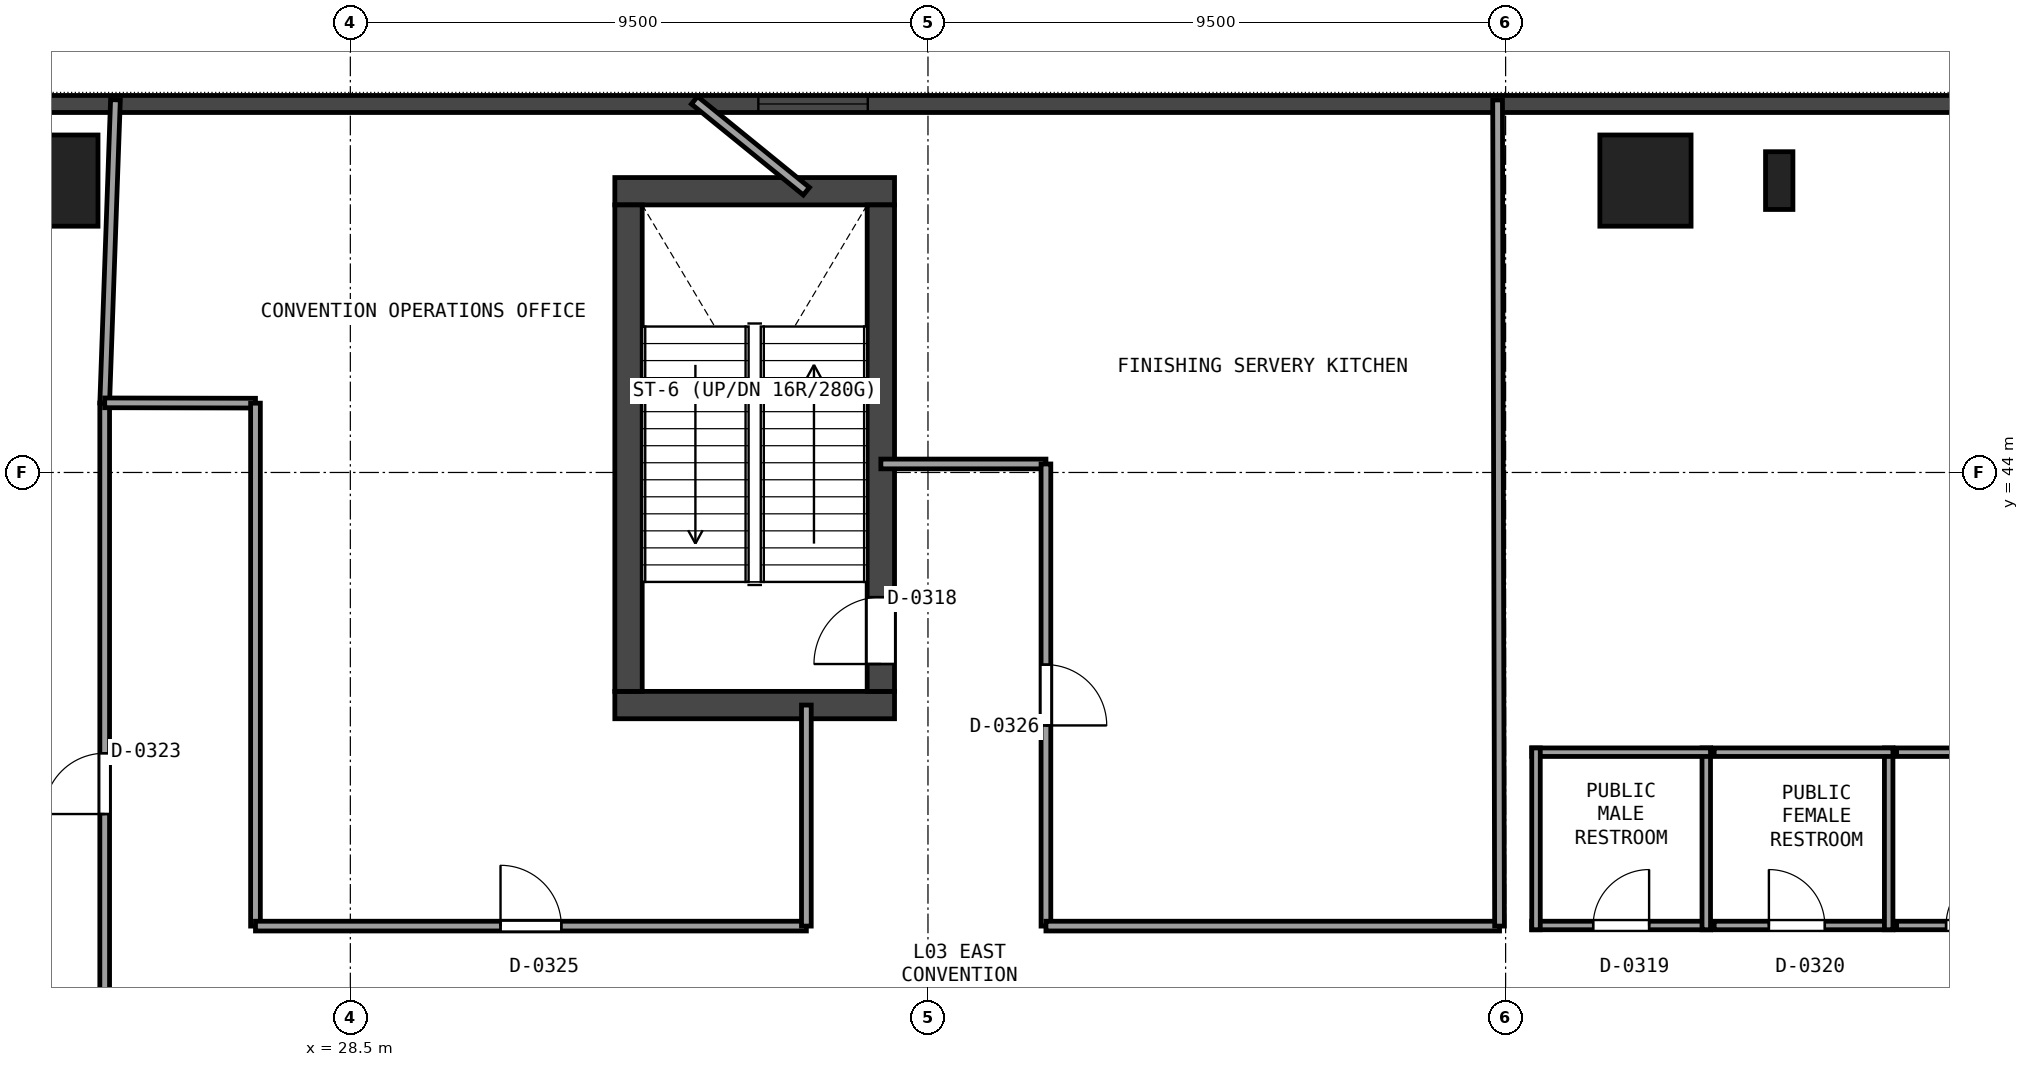
"""IFC4 building model, lengths in metres.
Left out: names, types, materials, properties, quantities, classifications, styles, units other than length and angle.
Written with IfcOpenShell. Run it as: python <this file> out.ifc"""

import sys

from ifc_helpers import new_model, si_unit, direction, frame, frame_2d, origin, origin_2d, place, context, subcontext, project, spatial, rectangle, extrude, element, fill, save


model = new_model("IFC4")
c1 = context("Model", 3, precision=1e-05, world=origin(), true_north=direction((0.0, 1.0)))
c2 = subcontext(c1, "Body", "Model", "MODEL_VIEW")
j1 = project(units=[si_unit("LENGTHUNIT", "METRE"), si_unit("PLANEANGLEUNIT", "RADIAN")], contexts=[c1])
p1 = place(None, origin())
s1 = spatial("IfcSite", under=j1, at=p1, CompositionType="ELEMENT")
p2 = place(p1, origin())
s2 = spatial("IfcBuilding", under=s1, at=p2, CompositionType="ELEMENT")
p3 = place(p2, frame((0.0, 0.0, 16.2)))
s3 = spatial("IfcBuildingStorey", under=s2, at=p3, CompositionType="ELEMENT", Elevation=16.2)
for number, where, z_axis, x_axis in (
    (1, (32.85, 40.175, 0.0), (0.0, 0.0, 1.0), (1.0, 0.0, 0.0)),
    (2, (32.85, 48.625, 0.0), (0.0, 0.0, 1.0), (1.0, 0.0, 0.0)),
):
    element("IfcWall", number, at=place(p3, frame(where, z_axis=z_axis, x_axis=x_axis)), inside=s3, PredefinedType="SHEAR", context=c2, shape_type="SweptSolid", body=[
        extrude(rectangle(XDim=4.6, YDim=0.45, at=frame_2d((2.3, 0.0))), origin(), (0.0, 0.0, 1.0), 4.98),
    ])
p4 = place(p3, frame((33.075, 40.4, 0.0), z_axis=(0.0, 0.0, 1.0), x_axis=(0.0, 1.0, 0.0)))
e3 = element("IfcWall", 3, at=p4, inside=s3, PredefinedType="SHEAR", context=c2, shape_type="SweptSolid", body=[
    extrude(rectangle(XDim=8.0, YDim=0.45, at=frame_2d((4.0, 0.0))), origin(), (0.0, 0.0, 1.0), 4.98),
])
p5 = place(p3, frame((37.225, 40.4, 0.0), z_axis=(0.0, 0.0, 1.0), x_axis=(0.0, 1.0, 0.0)))
e4 = element("IfcWall", 4, at=p5, inside=s3, PredefinedType="SHEAR", context=c2, shape_type="SweptSolid", body=[
    extrude(rectangle(XDim=8.0, YDim=0.45, at=frame_2d((4.0, 0.0))), origin(), (0.0, 0.0, 1.0), 4.98),
])
p6 = place(p5, frame((0.45, 0.0, 0.0)))
e5 = element("IfcOpeningElement", 5, at=p6, cuts=e4, PredefinedType="OPENING", context=c2, shape_type="SweptSolid", body=[
    extrude(rectangle(XDim=1.1, YDim=2.15, at=frame_2d((0.55, 1.075))), frame((0.0, 0.235, 0.0), z_axis=(0.0, -1.0, 0.0), x_axis=(1.0, 0.0, 0.0)), (0.0, 0.0, 1.0), 0.47),
])
for number, where, z_axis, x_axis in (
    (6, (49.8, 48.8, 0.0), (0.0, 0.0, 1.0), (1.0, 0.0, 0.0)),
    (7, (23.6, 48.8, 0.0), (0.0, 0.0, 1.0), (1.0, 0.0, 0.0)),
):
    element("IfcColumn", number, at=place(p3, frame(where, z_axis=z_axis, x_axis=x_axis)), inside=s3, PredefinedType="COLUMN", context=c2, shape_type="SweptSolid", body=[
        extrude(rectangle(XDim=1.5, YDim=1.5, at=origin_2d()), origin(), (0.0, 0.0, 1.0), 4.98),
    ])
p7 = place(p3, frame((52.0, 48.8, 0.0), z_axis=(0.0, 0.0, 1.0), x_axis=(1.0, 0.0, 0.0)))
e8 = element("IfcColumn", 8, at=p7, inside=s3, PredefinedType="PILASTER", context=c2, shape_type="SweptSolid", body=[
    extrude(rectangle(XDim=0.45, YDim=0.95, at=origin_2d()), origin(), (0.0, 0.0, 1.0), 4.98),
])
p8 = place(p3, frame((5.14, 50.06, 0.0), z_axis=(0.0, 0.0, 1.0), x_axis=(1.0, 0.0, 0.0)))
e9 = element("IfcWall", 9, at=p8, inside=s3, PredefinedType="SOLIDWALL", context=c2, shape_type="SweptSolid", body=[
    extrude(rectangle(XDim=64.52, YDim=0.28, at=frame_2d((32.26, 0.0))), origin(), (0.0, 0.0, 1.0), 4.98),
])
p9 = place(p8, frame((30.07, 0.0, 0.95)))
e10 = element("IfcOpeningElement", 10, at=p9, cuts=e9, PredefinedType="OPENING", context=c2, shape_type="SweptSolid", body=[
    extrude(rectangle(XDim=1.8, YDim=2.3, at=frame_2d((0.9, 1.15))), frame((0.0, 0.15, 0.0), z_axis=(0.0, -1.0, 0.0), x_axis=(1.0, 0.0, 0.0)), (0.0, 0.0, 1.0), 0.3),
])
p10 = place(p3, frame((47.93, 36.55, 0.0), z_axis=(0.0, 0.0, 1.0), x_axis=(1.0, 0.0, 0.0)))
e11 = element("IfcWall", 11, at=p10, inside=s3, PredefinedType="PARTITIONING", context=c2, shape_type="SweptSolid", body=[
    extrude(rectangle(XDim=2.94, YDim=0.14, at=frame_2d((1.47, 0.0))), origin(), (0.0, 0.0, 1.0), 4.065),
])
p11 = place(p10, frame((1.01, 0.0, 0.0)))
e12 = element("IfcOpeningElement", 12, at=p11, cuts=e11, PredefinedType="OPENING", context=c2, shape_type="SweptSolid", body=[
    extrude(rectangle(XDim=0.92, YDim=2.1, at=frame_2d((0.46, 1.05))), frame((0.0, 0.08, 0.0), z_axis=(0.0, -1.0, 0.0), x_axis=(1.0, 0.0, 0.0)), (0.0, 0.0, 1.0), 0.16),
])
p12 = place(p3, frame((50.8, 36.48, 0.0), z_axis=(0.0, 0.0, 1.0), x_axis=(0.0, 1.0, 0.0)))
e13 = element("IfcWall", 13, at=p12, inside=s3, PredefinedType="PARTITIONING", context=c2, shape_type="SweptSolid", body=[
    extrude(rectangle(XDim=2.99, YDim=0.14, at=frame_2d((1.495, 0.0))), origin(), (0.0, 0.0, 1.0), 4.609),
])
p13 = place(p3, frame((50.87, 39.4, 0.0), z_axis=(0.0, 0.0, 1.0), x_axis=(-1.0, 0.0, 0.0)))
e14 = element("IfcWall", 14, at=p13, inside=s3, PredefinedType="PARTITIONING", context=c2, shape_type="SweptSolid", body=[
    extrude(rectangle(XDim=2.94, YDim=0.14, at=frame_2d((1.47, 0.0))), origin(), (0.0, 0.0, 1.0), 4.065),
])
p14 = place(p3, frame((48.0, 39.47, 0.0), z_axis=(0.0, 0.0, 1.0), x_axis=(0.0, -1.0, 0.0)))
e15 = element("IfcWall", 15, at=p14, inside=s3, PredefinedType="PARTITIONING", context=c2, shape_type="SweptSolid", body=[
    extrude(rectangle(XDim=2.99, YDim=0.14, at=frame_2d((1.495, 0.0))), origin(), (0.0, 0.0, 1.0), 4.065),
])
p15 = place(p3, frame((50.93, 36.55, 0.0), z_axis=(0.0, 0.0, 1.0), x_axis=(1.0, 0.0, 0.0)))
e16 = element("IfcWall", 16, at=p15, inside=s3, PredefinedType="PARTITIONING", context=c2, shape_type="SweptSolid", body=[
    extrude(rectangle(XDim=2.94, YDim=0.14, at=frame_2d((1.47, 0.0))), origin(), (0.0, 0.0, 1.0), 4.98),
])
p16 = place(p15, frame((0.9, 0.0, 0.0)))
e17 = element("IfcOpeningElement", 17, at=p16, cuts=e16, PredefinedType="OPENING", context=c2, shape_type="SweptSolid", body=[
    extrude(rectangle(XDim=0.92, YDim=2.1, at=frame_2d((0.46, 1.05))), frame((0.0, 0.08, 0.0), z_axis=(0.0, -1.0, 0.0), x_axis=(1.0, 0.0, 0.0)), (0.0, 0.0, 1.0), 0.16),
])
p17 = place(p3, frame((53.8, 36.48, 0.0), z_axis=(0.0, 0.0, 1.0), x_axis=(0.0, 1.0, 0.0)))
e18 = element("IfcWall", 18, at=p17, inside=s3, PredefinedType="PARTITIONING", context=c2, shape_type="SweptSolid", body=[
    extrude(rectangle(XDim=2.99, YDim=0.14, at=frame_2d((1.495, 0.0))), origin(), (0.0, 0.0, 1.0), 4.609),
])
p18 = place(p3, frame((53.87, 39.4, 0.0), z_axis=(0.0, 0.0, 1.0), x_axis=(-1.0, 0.0, 0.0)))
e19 = element("IfcWall", 19, at=p18, inside=s3, PredefinedType="PARTITIONING", context=c2, shape_type="SweptSolid", body=[
    extrude(rectangle(XDim=2.94, YDim=0.14, at=frame_2d((1.47, 0.0))), origin(), (0.0, 0.0, 1.0), 4.609),
])
p19 = place(p3, frame((53.93, 36.55, 0.0), z_axis=(0.0, 0.0, 1.0), x_axis=(1.0, 0.0, 0.0)))
e20 = element("IfcWall", 20, at=p19, inside=s3, PredefinedType="PARTITIONING", context=c2, shape_type="SweptSolid", body=[
    extrude(rectangle(XDim=2.74, YDim=0.14, at=frame_2d((1.37, 0.0))), origin(), (0.0, 0.0, 1.0), 4.98),
])
p20 = place(p19, frame((0.814, 0.0, 0.0)))
e21 = element("IfcOpeningElement", 21, at=p20, cuts=e20, PredefinedType="OPENING", context=c2, shape_type="SweptSolid", body=[
    extrude(rectangle(XDim=0.92, YDim=2.1, at=frame_2d((0.46, 1.05))), frame((0.0, 0.08, 0.0), z_axis=(0.0, -1.0, 0.0), x_axis=(1.0, 0.0, 0.0)), (0.0, 0.0, 1.0), 0.16),
])
p21 = place(p3, frame((56.67, 39.4, 0.0), z_axis=(0.0, 0.0, 1.0), x_axis=(-1.0, 0.0, 0.0)))
e22 = element("IfcWall", 22, at=p21, inside=s3, PredefinedType="PARTITIONING", context=c2, shape_type="SweptSolid", body=[
    extrude(rectangle(XDim=2.74, YDim=0.14, at=frame_2d((1.37, 0.0))), origin(), (0.0, 0.0, 1.0), 4.609),
])
p22 = place(p3, frame((24.46, 32.625, 0.0), z_axis=(0.0, 0.0, 1.0), x_axis=(0.0, 1.0, 0.0)))
e23 = element("IfcWall", 23, at=p22, inside=s3, PredefinedType="PARTITIONING", context=c2, shape_type="SweptSolid", body=[
    extrude(rectangle(XDim=12.515, YDim=0.16, at=frame_2d((6.257, 0.0))), origin(), (0.0, 0.0, 1.0), 4.065),
])
p23 = place(p22, frame((5.758, 0.0, 0.0)))
e24 = element("IfcOpeningElement", 24, at=p23, cuts=e23, PredefinedType="OPENING", context=c2, shape_type="SweptSolid", body=[
    extrude(rectangle(XDim=1.0, YDim=2.15, at=frame_2d((0.5, 1.075))), frame((0.0, 0.09, 0.0), z_axis=(0.0, -1.0, 0.0), x_axis=(1.0, 0.0, 0.0)), (0.0, 0.0, 1.0), 0.18),
])
p24 = place(p3, frame((24.46, 45.14, 0.0), z_axis=(0.0, 0.0, 1.0), x_axis=(0.035456038504, 0.999371236995, 0.0)))
e25 = element("IfcWall", 25, at=p24, inside=s3, PredefinedType="PARTITIONING", context=c2, shape_type="SweptSolid", body=[
    extrude(rectangle(XDim=4.992, YDim=0.16, at=frame_2d((2.496, 0.0))), origin(), (0.0, 0.0, 1.0), 4.065),
])
p25 = place(p3, frame((24.46, 45.145, 0.0), z_axis=(0.0, 0.0, 1.0), x_axis=(0.999997863068, -0.002067331672, 0.0)))
e26 = element("IfcWall", 26, at=p25, inside=s3, PredefinedType="PARTITIONING", context=c2, shape_type="SweptSolid", body=[
    extrude(rectangle(XDim=2.48, YDim=0.16, at=frame_2d((1.24, 0.0))), origin(), (0.0, 0.0, 1.0), 4.065),
])
p26 = place(p3, frame((26.94, 45.14, 0.0), z_axis=(0.0, 0.0, 1.0), x_axis=(0.0, -1.0, 0.0)))
e27 = element("IfcWall", 27, at=p26, inside=s3, PredefinedType="PARTITIONING", context=c2, shape_type="SweptSolid", body=[
    extrude(rectangle(XDim=8.6, YDim=0.16, at=frame_2d((4.3, 0.0))), origin(), (0.0, 0.0, 1.0), 4.98),
])
p27 = place(p3, frame((26.94, 36.54, 0.0), z_axis=(0.0, 0.0, 1.0), x_axis=(1.0, 0.0, 0.0)))
e28 = element("IfcWall", 28, at=p27, inside=s3, PredefinedType="PARTITIONING", context=c2, shape_type="SweptSolid", body=[
    extrude(rectangle(XDim=9.06, YDim=0.16, at=frame_2d((4.53, 0.0))), origin(), (0.0, 0.0, 1.0), 4.98),
])
p28 = place(p27, frame((4.03, 0.0, 0.0)))
e29 = element("IfcOpeningElement", 29, at=p28, cuts=e28, PredefinedType="OPENING", context=c2, shape_type="SweptSolid", body=[
    extrude(rectangle(XDim=1.0, YDim=2.15, at=frame_2d((0.5, 1.075))), frame((0.0, 0.09, 0.0), z_axis=(0.0, -1.0, 0.0), x_axis=(1.0, 0.0, 0.0)), (0.0, 0.0, 1.0), 0.18),
])
p29 = place(p3, frame((36.0, 36.54, 0.0), z_axis=(0.0, 0.0, 1.0), x_axis=(0.0, 1.0, 0.0)))
e30 = element("IfcWall", 30, at=p29, inside=s3, PredefinedType="PARTITIONING", context=c2, shape_type="SweptSolid", body=[
    extrude(rectangle(XDim=3.635, YDim=0.16, at=frame_2d((1.817, 0.0))), origin(), (0.0, 0.0, 1.0), 4.98),
])
p30 = place(p3, frame((36.0, 48.625, 0.0), z_axis=(0.0, 0.0, 1.0), x_axis=(-0.775902978213, 0.630852255604, 0.0)))
e31 = element("IfcWall", 31, at=p30, inside=s3, PredefinedType="PARTITIONING", context=c2, shape_type="SweptSolid", body=[
    extrude(rectangle(XDim=2.372, YDim=0.16, at=frame_2d((1.186, 0.0))), origin(), (0.0, 0.0, 1.0), 4.121),
])
p31 = place(p3, frame((37.225, 44.14, 0.0), z_axis=(0.0, 0.0, 1.0), x_axis=(1.0, 0.0, 0.0)))
e32 = element("IfcWall", 32, at=p31, inside=s3, PredefinedType="PARTITIONING", context=c2, shape_type="SweptSolid", body=[
    extrude(rectangle(XDim=2.715, YDim=0.16, at=frame_2d((1.357, 0.0))), origin(), (0.0, 0.0, 1.0), 4.98),
])
p32 = place(p3, frame((39.94, 44.14, 0.0), z_axis=(0.0, 0.0, 1.0), x_axis=(0.0, -1.0, 0.0)))
e33 = element("IfcWall", 33, at=p32, inside=s3, PredefinedType="PARTITIONING", context=c2, shape_type="SweptSolid", body=[
    extrude(rectangle(XDim=7.6, YDim=0.16, at=frame_2d((3.8, 0.0))), origin(), (0.0, 0.0, 1.0), 4.98),
])
p33 = place(p32, frame((3.3, 0.0, 0.0)))
e34 = element("IfcOpeningElement", 34, at=p33, cuts=e33, PredefinedType="OPENING", context=c2, shape_type="SweptSolid", body=[
    extrude(rectangle(XDim=1.0, YDim=2.15, at=frame_2d((0.5, 1.075))), frame((0.0, 0.09, 0.0), z_axis=(0.0, -1.0, 0.0), x_axis=(1.0, 0.0, 0.0)), (0.0, 0.0, 1.0), 0.18),
])
p34 = place(p3, frame((39.94, 36.54, 0.0), z_axis=(0.0, 0.0, 1.0), x_axis=(1.0, 0.0, 0.0)))
e35 = element("IfcWall", 35, at=p34, inside=s3, PredefinedType="PARTITIONING", context=c2, shape_type="SweptSolid", body=[
    extrude(rectangle(XDim=7.46, YDim=0.16, at=frame_2d((3.73, 0.0))), origin(), (0.0, 0.0, 1.0), 4.98),
])
p35 = place(p3, frame((47.4, 36.54, 0.0), z_axis=(0.0, 0.0, 1.0), x_axis=(-0.002354076283, 0.999997229159, 0.0)))
e36 = element("IfcWall", 36, at=p35, inside=s3, PredefinedType="PARTITIONING", context=c2, shape_type="SweptSolid", body=[
    extrude(rectangle(XDim=13.586, YDim=0.16, at=frame_2d((6.793, 0.0))), origin(), (0.0, 0.0, 1.0), 4.121),
])
p36 = place(p9, origin())
e37 = element("IfcWindow", 37, at=p36, inside=s3, PartitioningType="SINGLE_PANEL", PredefinedType="WINDOW", context=c2, shape_type="SweptSolid", body=[
    extrude(rectangle(XDim=1.8, YDim=2.3, at=frame_2d((0.9, 1.15))), frame((0.0, 0.03, 0.0), z_axis=(0.0, -1.0, 0.0), x_axis=(1.0, 0.0, 0.0)), (0.0, 0.0, 1.0), 0.06),
])
fill(e10, e37)
p37 = place(p6, origin())
e38 = element("IfcDoor", 38, at=p37, inside=s3, OperationType="SINGLE_SWING_LEFT", PredefinedType="DOOR", context=c2, shape_type="SweptSolid", body=[
    extrude(rectangle(XDim=1.1, YDim=2.15, at=frame_2d((0.55, 1.075))), frame((0.0, 0.025, 0.0), z_axis=(0.0, -1.0, 0.0), x_axis=(1.0, 0.0, 0.0)), (0.0, 0.0, 1.0), 0.05),
])
fill(e5, e38)
p38 = place(p11, origin())
e39 = element("IfcDoor", 39, at=p38, inside=s3, OperationType="SINGLE_SWING_RIGHT", PredefinedType="DOOR", context=c2, shape_type="SweptSolid", body=[
    extrude(rectangle(XDim=0.92, YDim=2.1, at=frame_2d((0.46, 1.05))), frame((0.0, 0.025, 0.0), z_axis=(0.0, -1.0, 0.0), x_axis=(1.0, 0.0, 0.0)), (0.0, 0.0, 1.0), 0.05),
])
fill(e12, e39)
p39 = place(p16, origin())
e40 = element("IfcDoor", 40, at=p39, inside=s3, OperationType="SINGLE_SWING_LEFT", PredefinedType="DOOR", context=c2, shape_type="SweptSolid", body=[
    extrude(rectangle(XDim=0.92, YDim=2.1, at=frame_2d((0.46, 1.05))), frame((0.0, 0.025, 0.0), z_axis=(0.0, -1.0, 0.0), x_axis=(1.0, 0.0, 0.0)), (0.0, 0.0, 1.0), 0.05),
])
fill(e17, e40)
p40 = place(p20, origin())
e41 = element("IfcDoor", 41, at=p40, inside=s3, OperationType="SINGLE_SWING_RIGHT", PredefinedType="DOOR", context=c2, shape_type="SweptSolid", body=[
    extrude(rectangle(XDim=0.92, YDim=2.1, at=frame_2d((0.46, 1.05))), frame((0.0, 0.025, 0.0), z_axis=(0.0, -1.0, 0.0), x_axis=(1.0, 0.0, 0.0)), (0.0, 0.0, 1.0), 0.05),
])
fill(e21, e41)
p41 = place(p23, origin())
e42 = element("IfcDoor", 42, at=p41, inside=s3, OperationType="SINGLE_SWING_LEFT", PredefinedType="DOOR", context=c2, shape_type="SweptSolid", body=[
    extrude(rectangle(XDim=1.0, YDim=2.15, at=frame_2d((0.5, 1.075))), frame((0.0, 0.025, 0.0), z_axis=(0.0, -1.0, 0.0), x_axis=(1.0, 0.0, 0.0)), (0.0, 0.0, 1.0), 0.05),
])
fill(e24, e42)
p42 = place(p28, origin())
e43 = element("IfcDoor", 43, at=p42, inside=s3, OperationType="SINGLE_SWING_LEFT", PredefinedType="DOOR", context=c2, shape_type="SweptSolid", body=[
    extrude(rectangle(XDim=1.0, YDim=2.15, at=frame_2d((0.5, 1.075))), frame((0.0, 0.025, 0.0), z_axis=(0.0, -1.0, 0.0), x_axis=(1.0, 0.0, 0.0)), (0.0, 0.0, 1.0), 0.05),
])
fill(e29, e43)
p43 = place(p33, origin())
e44 = element("IfcDoor", 44, at=p43, inside=s3, OperationType="SINGLE_SWING_RIGHT", PredefinedType="DOOR", context=c2, shape_type="SweptSolid", body=[
    extrude(rectangle(XDim=1.0, YDim=2.15, at=frame_2d((0.5, 1.075))), frame((0.0, 0.025, 0.0), z_axis=(0.0, -1.0, 0.0), x_axis=(1.0, 0.0, 0.0)), (0.0, 0.0, 1.0), 0.05),
])
fill(e34, e44)
save(model, sys.argv[1])
